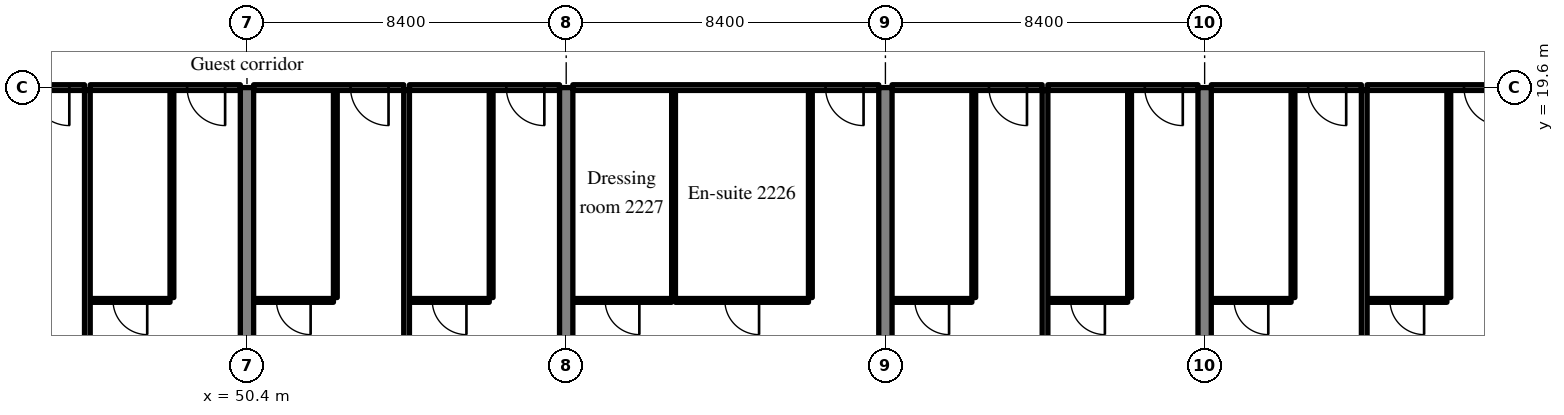
"""IFC4 building model, lengths in metres.
Left out: names, types, materials, properties, quantities, classifications, styles, units other than length and angle.
Written with IfcOpenShell. Run it as: python <this file> out.ifc"""

import sys

from ifc_helpers import new_model, si_unit, direction, frame, frame_2d, origin, place, context, subcontext, project, spatial, rectangle, extrude, source, transform, mapped, element, fill, save


model = new_model("IFC4")
c1 = context("Model", 3, precision=1e-05, world=origin(), true_north=direction((0.0, 1.0)))
c2 = subcontext(c1, "Body", "Model", "MODEL_VIEW")
j1 = project(units=[si_unit("LENGTHUNIT", "METRE"), si_unit("PLANEANGLEUNIT", "RADIAN")], contexts=[c1])
p1 = place(None, origin())
s1 = spatial("IfcSite", under=j1, at=p1, CompositionType="ELEMENT")
p2 = place(p1, origin())
s2 = spatial("IfcBuilding", under=s1, at=p2, CompositionType="ELEMENT")
p3 = place(p2, frame((0.0, 0.0, 95.2)))
s3 = spatial("IfcBuildingStorey", under=s2, at=p3, CompositionType="ELEMENT", Elevation=95.2)
m1 = source(origin(), c2, "Body", "SweptSolid", [
    extrude(rectangle(XDim=13.1, YDim=0.35, at=frame_2d((6.55, 0.0))), origin(), (0.0, 0.0, 1.0), 3.52),
])
p4 = place(p3, frame((50.4, 6.5, 0.0), z_axis=(0.0, 0.0, 1.0), x_axis=(0.0, 1.0, 0.0)))
e1 = element("IfcWall", 1, at=p4, inside=s3, PredefinedType="SHEAR", context=c2, shape_type="MappedRepresentation", body=[
    mapped(m1, transform((0.0, 0.0, 0.0), scale=1.0)),
])
m2 = source(origin(), c2, "Body", "SweptSolid", [
    extrude(rectangle(XDim=14.1, YDim=0.35, at=frame_2d((7.05, 0.0))), origin(), (0.0, 0.0, 1.0), 3.52),
])
for number, where, z_axis, x_axis in (
    (2, (58.8, 5.5, 0.0), (0.0, 0.0, 1.0), (0.0, 1.0, 0.0)),
    (3, (67.2, 5.5, 0.0), (0.0, 0.0, 1.0), (0.0, 1.0, 0.0)),
    (4, (75.6, 5.5, 0.0), (0.0, 0.0, 1.0), (0.0, 1.0, 0.0)),
):
    element("IfcWall", number, at=place(p3, frame(where, z_axis=z_axis, x_axis=x_axis)), inside=s3, PredefinedType="SHEAR", context=c2, shape_type="MappedRepresentation", body=[
        mapped(m2, transform((0.0, 0.0, 0.0), scale=1.0)),
    ])
m3 = source(origin(), c2, "Body", "SweptSolid", [
    extrude(rectangle(XDim=3.95, YDim=0.15, at=frame_2d((1.975, 0.0))), origin(), (0.0, 0.0, 1.0), 2.82),
])
p5 = place(p3, frame((42.175, 19.6, 0.0), z_axis=(0.0, 0.0, 1.0), x_axis=(1.0, 0.0, 0.0)))
e5 = element("IfcWall", 5, at=p5, inside=s3, PredefinedType="PARTITIONING", context=c2, shape_type="MappedRepresentation", body=[
    mapped(m3, transform((0.0, 0.0, 0.0), scale=1.0)),
])
m4 = source(origin(), c2, "Body", "SweptSolid", [
    extrude(rectangle(XDim=1.0, YDim=2.1, at=frame_2d((0.5, 1.05))), frame((0.0, 0.085, 0.0), z_axis=(0.0, -1.0, 0.0), x_axis=(1.0, 0.0, 0.0)), (0.0, 0.0, 1.0), 0.17),
])
p6 = place(p5, frame((2.55, 0.0, 0.0)))
e6 = element("IfcOpeningElement", 6, at=p6, cuts=e5, PredefinedType="OPENING", context=c2, shape_type="MappedRepresentation", body=[
    mapped(m4, transform((0.0, 0.0, 0.0), scale=1.0)),
])
m5 = source(origin(), c2, "Body", "SweptSolid", [
    extrude(rectangle(XDim=5.45, YDim=0.1, at=frame_2d((2.725, 0.0))), origin(), (0.0, 0.0, 1.0), 3.52),
])
p7 = place(p3, frame((48.425, 14.075, 0.0), z_axis=(0.0, 0.0, 1.0), x_axis=(0.0, 1.0, 0.0)))
e7 = element("IfcWall", 7, at=p7, inside=s3, PredefinedType="PARTITIONING", context=c2, shape_type="MappedRepresentation", body=[
    mapped(m5, transform((0.0, 0.0, 0.0), scale=1.0)),
])
m6 = source(origin(), c2, "Body", "SweptSolid", [
    extrude(rectangle(XDim=2.1, YDim=0.1, at=frame_2d((1.05, 0.0))), origin(), (0.0, 0.0, 1.0), 3.52),
])
p8 = place(p3, frame((46.275, 14.0, 0.0), z_axis=(0.0, 0.0, 1.0), x_axis=(1.0, 0.0, 0.0)))
e8 = element("IfcWall", 8, at=p8, inside=s3, PredefinedType="PARTITIONING", context=c2, shape_type="MappedRepresentation", body=[
    mapped(m6, transform((0.0, 0.0, 0.0), scale=1.0)),
])
m7 = source(origin(), c2, "Body", "SweptSolid", [
    extrude(rectangle(XDim=0.9, YDim=2.1, at=frame_2d((0.45, 1.05))), frame((0.0, 0.06, 0.0), z_axis=(0.0, -1.0, 0.0), x_axis=(1.0, 0.0, 0.0)), (0.0, 0.0, 1.0), 0.12),
])
p9 = place(p8, frame((0.6, 0.0, 0.0)))
e9 = element("IfcOpeningElement", 9, at=p9, cuts=e8, PredefinedType="OPENING", context=c2, shape_type="MappedRepresentation", body=[
    mapped(m7, transform((0.0, 0.0, 0.0), scale=1.0)),
])
m8 = source(origin(), c2, "Body", "SweptSolid", [
    extrude(rectangle(XDim=3.95, YDim=0.15, at=frame_2d((1.975, 0.0))), origin(), (0.0, 0.0, 1.0), 2.82),
])
p10 = place(p3, frame((46.275, 19.6, 0.0), z_axis=(0.0, 0.0, 1.0), x_axis=(1.0, 0.0, 0.0)))
e10 = element("IfcWall", 10, at=p10, inside=s3, PredefinedType="PARTITIONING", context=c2, shape_type="MappedRepresentation", body=[
    mapped(m8, transform((0.0, 0.0, 0.0), scale=1.0)),
])
p11 = place(p10, frame((2.55, 0.0, 0.0)))
e11 = element("IfcOpeningElement", 11, at=p11, cuts=e10, PredefinedType="OPENING", context=c2, shape_type="MappedRepresentation", body=[
    mapped(m4, transform((0.0, 0.0, 0.0), scale=1.0)),
])
m9 = source(origin(), c2, "Body", "SweptSolid", [
    extrude(rectangle(XDim=14.906, YDim=0.15, at=frame_2d((7.453, 0.0))), origin(), (0.0, 0.0, 1.0), 3.52),
])
p12 = place(p3, frame((46.2, 4.619, 0.0), z_axis=(0.0, 0.0, 1.0), x_axis=(0.0, 1.0, 0.0)))
e12 = element("IfcWall", 12, at=p12, inside=s3, PredefinedType="PARTITIONING", context=c2, shape_type="MappedRepresentation", body=[
    mapped(m9, transform((0.0, 0.0, 0.0), scale=1.0)),
])
p13 = place(p3, frame((52.725, 14.075, 0.0), z_axis=(0.0, 0.0, 1.0), x_axis=(0.0, 1.0, 0.0)))
e13 = element("IfcWall", 13, at=p13, inside=s3, PredefinedType="PARTITIONING", context=c2, shape_type="MappedRepresentation", body=[
    mapped(m5, transform((0.0, 0.0, 0.0), scale=1.0)),
])
p14 = place(p3, frame((50.575, 14.0, 0.0), z_axis=(0.0, 0.0, 1.0), x_axis=(1.0, 0.0, 0.0)))
e14 = element("IfcWall", 14, at=p14, inside=s3, PredefinedType="PARTITIONING", context=c2, shape_type="MappedRepresentation", body=[
    mapped(m6, transform((0.0, 0.0, 0.0), scale=1.0)),
])
p15 = place(p14, frame((0.6, 0.0, 0.0)))
e15 = element("IfcOpeningElement", 15, at=p15, cuts=e14, PredefinedType="OPENING", context=c2, shape_type="MappedRepresentation", body=[
    mapped(m7, transform((0.0, 0.0, 0.0), scale=1.0)),
])
p16 = place(p3, frame((50.575, 19.6, 0.0), z_axis=(0.0, 0.0, 1.0), x_axis=(1.0, 0.0, 0.0)))
e16 = element("IfcWall", 16, at=p16, inside=s3, PredefinedType="PARTITIONING", context=c2, shape_type="MappedRepresentation", body=[
    mapped(m3, transform((0.0, 0.0, 0.0), scale=1.0)),
])
p17 = place(p16, frame((2.55, 0.0, 0.0)))
e17 = element("IfcOpeningElement", 17, at=p17, cuts=e16, PredefinedType="OPENING", context=c2, shape_type="MappedRepresentation", body=[
    mapped(m4, transform((0.0, 0.0, 0.0), scale=1.0)),
])
p18 = place(p3, frame((56.825, 14.075, 0.0), z_axis=(0.0, 0.0, 1.0), x_axis=(0.0, 1.0, 0.0)))
e18 = element("IfcWall", 18, at=p18, inside=s3, PredefinedType="PARTITIONING", context=c2, shape_type="MappedRepresentation", body=[
    mapped(m5, transform((0.0, 0.0, 0.0), scale=1.0)),
])
m10 = source(origin(), c2, "Body", "SweptSolid", [
    extrude(rectangle(XDim=2.1, YDim=0.1, at=frame_2d((1.05, 0.0))), origin(), (0.0, 0.0, 1.0), 3.52),
])
p19 = place(p3, frame((54.675, 14.0, 0.0), z_axis=(0.0, 0.0, 1.0), x_axis=(1.0, 0.0, 0.0)))
e19 = element("IfcWall", 19, at=p19, inside=s3, PredefinedType="PARTITIONING", context=c2, shape_type="MappedRepresentation", body=[
    mapped(m10, transform((0.0, 0.0, 0.0), scale=1.0)),
])
p20 = place(p19, frame((0.6, 0.0, 0.0)))
e20 = element("IfcOpeningElement", 20, at=p20, cuts=e19, PredefinedType="OPENING", context=c2, shape_type="MappedRepresentation", body=[
    mapped(m7, transform((0.0, 0.0, 0.0), scale=1.0)),
])
p21 = place(p3, frame((54.675, 19.6, 0.0), z_axis=(0.0, 0.0, 1.0), x_axis=(1.0, 0.0, 0.0)))
e21 = element("IfcWall", 21, at=p21, inside=s3, PredefinedType="PARTITIONING", context=c2, shape_type="MappedRepresentation", body=[
    mapped(m3, transform((0.0, 0.0, 0.0), scale=1.0)),
])
p22 = place(p21, frame((2.55, 0.0, 0.0)))
e22 = element("IfcOpeningElement", 22, at=p22, cuts=e21, PredefinedType="OPENING", context=c2, shape_type="MappedRepresentation", body=[
    mapped(m4, transform((0.0, 0.0, 0.0), scale=1.0)),
])
p23 = place(p3, frame((54.6, 4.619, 0.0), z_axis=(0.0, 0.0, 1.0), x_axis=(0.0, 1.0, 0.0)))
e23 = element("IfcWall", 23, at=p23, inside=s3, PredefinedType="PARTITIONING", context=c2, shape_type="MappedRepresentation", body=[
    mapped(m9, transform((0.0, 0.0, 0.0), scale=1.0)),
])
for number, where, z_axis, x_axis in (
    (24, (65.225, 14.075, 0.0), (0.0, 0.0, 1.0), (0.0, 1.0, 0.0)),
    (25, (61.625, 14.075, 0.0), (0.0, 0.0, 1.0), (0.0, 1.0, 0.0)),
):
    element("IfcWall", number, at=place(p3, frame(where, z_axis=z_axis, x_axis=x_axis)), inside=s3, PredefinedType="PARTITIONING", context=c2, shape_type="MappedRepresentation", body=[
        mapped(m5, transform((0.0, 0.0, 0.0), scale=1.0)),
    ])
m11 = source(origin(), c2, "Body", "SweptSolid", [
    extrude(rectangle(XDim=3.5, YDim=0.1, at=frame_2d((1.75, 0.0))), origin(), (0.0, 0.0, 1.0), 3.52),
])
p24 = place(p3, frame((61.675, 14.0, 0.0), z_axis=(0.0, 0.0, 1.0), x_axis=(1.0, 0.0, 0.0)))
e26 = element("IfcWall", 26, at=p24, inside=s3, PredefinedType="PARTITIONING", context=c2, shape_type="MappedRepresentation", body=[
    mapped(m11, transform((0.0, 0.0, 0.0), scale=1.0)),
])
p25 = place(p24, frame((1.3, 0.0, 0.0)))
e27 = element("IfcOpeningElement", 27, at=p25, cuts=e26, PredefinedType="OPENING", context=c2, shape_type="MappedRepresentation", body=[
    mapped(m7, transform((0.0, 0.0, 0.0), scale=1.0)),
])
m12 = source(origin(), c2, "Body", "SweptSolid", [
    extrude(rectangle(XDim=2.6, YDim=0.1, at=frame_2d((1.3, 0.0))), origin(), (0.0, 0.0, 1.0), 3.52),
])
p26 = place(p3, frame((58.975, 14.0, 0.0), z_axis=(0.0, 0.0, 1.0), x_axis=(1.0, 0.0, 0.0)))
e28 = element("IfcWall", 28, at=p26, inside=s3, PredefinedType="PARTITIONING", context=c2, shape_type="MappedRepresentation", body=[
    mapped(m12, transform((0.0, 0.0, 0.0), scale=1.0)),
])
p27 = place(p26, frame((0.85, 0.0, 0.0)))
e29 = element("IfcOpeningElement", 29, at=p27, cuts=e28, PredefinedType="OPENING", context=c2, shape_type="MappedRepresentation", body=[
    mapped(m7, transform((0.0, 0.0, 0.0), scale=1.0)),
])
m13 = source(origin(), c2, "Body", "SweptSolid", [
    extrude(rectangle(XDim=8.05, YDim=0.15, at=frame_2d((4.025, 0.0))), origin(), (0.0, 0.0, 1.0), 2.82),
])
p28 = place(p3, frame((58.975, 19.6, 0.0), z_axis=(0.0, 0.0, 1.0), x_axis=(1.0, 0.0, 0.0)))
e30 = element("IfcWall", 30, at=p28, inside=s3, PredefinedType="PARTITIONING", context=c2, shape_type="MappedRepresentation", body=[
    mapped(m13, transform((0.0, 0.0, 0.0), scale=1.0)),
])
p29 = place(p28, frame((6.65, 0.0, 0.0)))
e31 = element("IfcOpeningElement", 31, at=p29, cuts=e30, PredefinedType="OPENING", context=c2, shape_type="MappedRepresentation", body=[
    mapped(m4, transform((0.0, 0.0, 0.0), scale=1.0)),
])
p30 = place(p3, frame((69.525, 14.075, 0.0), z_axis=(0.0, 0.0, 1.0), x_axis=(0.0, 1.0, 0.0)))
e32 = element("IfcWall", 32, at=p30, inside=s3, PredefinedType="PARTITIONING", context=c2, shape_type="MappedRepresentation", body=[
    mapped(m5, transform((0.0, 0.0, 0.0), scale=1.0)),
])
p31 = place(p3, frame((67.375, 14.0, 0.0), z_axis=(0.0, 0.0, 1.0), x_axis=(1.0, 0.0, 0.0)))
e33 = element("IfcWall", 33, at=p31, inside=s3, PredefinedType="PARTITIONING", context=c2, shape_type="MappedRepresentation", body=[
    mapped(m6, transform((0.0, 0.0, 0.0), scale=1.0)),
])
p32 = place(p31, frame((0.6, 0.0, 0.0)))
e34 = element("IfcOpeningElement", 34, at=p32, cuts=e33, PredefinedType="OPENING", context=c2, shape_type="MappedRepresentation", body=[
    mapped(m7, transform((0.0, 0.0, 0.0), scale=1.0)),
])
p33 = place(p3, frame((67.375, 19.6, 0.0), z_axis=(0.0, 0.0, 1.0), x_axis=(1.0, 0.0, 0.0)))
e35 = element("IfcWall", 35, at=p33, inside=s3, PredefinedType="PARTITIONING", context=c2, shape_type="MappedRepresentation", body=[
    mapped(m3, transform((0.0, 0.0, 0.0), scale=1.0)),
])
p34 = place(p33, frame((2.55, 0.0, 0.0)))
e36 = element("IfcOpeningElement", 36, at=p34, cuts=e35, PredefinedType="OPENING", context=c2, shape_type="MappedRepresentation", body=[
    mapped(m4, transform((0.0, 0.0, 0.0), scale=1.0)),
])
p35 = place(p3, frame((73.625, 14.075, 0.0), z_axis=(0.0, 0.0, 1.0), x_axis=(0.0, 1.0, 0.0)))
e37 = element("IfcWall", 37, at=p35, inside=s3, PredefinedType="PARTITIONING", context=c2, shape_type="MappedRepresentation", body=[
    mapped(m5, transform((0.0, 0.0, 0.0), scale=1.0)),
])
p36 = place(p3, frame((71.475, 14.0, 0.0), z_axis=(0.0, 0.0, 1.0), x_axis=(1.0, 0.0, 0.0)))
e38 = element("IfcWall", 38, at=p36, inside=s3, PredefinedType="PARTITIONING", context=c2, shape_type="MappedRepresentation", body=[
    mapped(m10, transform((0.0, 0.0, 0.0), scale=1.0)),
])
p37 = place(p36, frame((0.6, 0.0, 0.0)))
e39 = element("IfcOpeningElement", 39, at=p37, cuts=e38, PredefinedType="OPENING", context=c2, shape_type="MappedRepresentation", body=[
    mapped(m7, transform((0.0, 0.0, 0.0), scale=1.0)),
])
p38 = place(p3, frame((71.475, 19.6, 0.0), z_axis=(0.0, 0.0, 1.0), x_axis=(1.0, 0.0, 0.0)))
e40 = element("IfcWall", 40, at=p38, inside=s3, PredefinedType="PARTITIONING", context=c2, shape_type="MappedRepresentation", body=[
    mapped(m3, transform((0.0, 0.0, 0.0), scale=1.0)),
])
p39 = place(p38, frame((2.55, 0.0, 0.0)))
e41 = element("IfcOpeningElement", 41, at=p39, cuts=e40, PredefinedType="OPENING", context=c2, shape_type="MappedRepresentation", body=[
    mapped(m4, transform((0.0, 0.0, 0.0), scale=1.0)),
])
m14 = source(origin(), c2, "Body", "SweptSolid", [
    extrude(rectangle(XDim=12.275, YDim=0.15, at=frame_2d((6.137, 0.0))), origin(), (0.0, 0.0, 1.0), 3.52),
])
p40 = place(p3, frame((71.4, 7.25, 0.0), z_axis=(0.0, 0.0, 1.0), x_axis=(0.0, 1.0, 0.0)))
e42 = element("IfcWall", 42, at=p40, inside=s3, PredefinedType="PARTITIONING", context=c2, shape_type="MappedRepresentation", body=[
    mapped(m14, transform((0.0, 0.0, 0.0), scale=1.0)),
])
p41 = place(p3, frame((77.925, 14.075, 0.0), z_axis=(0.0, 0.0, 1.0), x_axis=(0.0, 1.0, 0.0)))
e43 = element("IfcWall", 43, at=p41, inside=s3, PredefinedType="PARTITIONING", context=c2, shape_type="MappedRepresentation", body=[
    mapped(m5, transform((0.0, 0.0, 0.0), scale=1.0)),
])
p42 = place(p3, frame((75.775, 14.0, 0.0), z_axis=(0.0, 0.0, 1.0), x_axis=(1.0, 0.0, 0.0)))
e44 = element("IfcWall", 44, at=p42, inside=s3, PredefinedType="PARTITIONING", context=c2, shape_type="MappedRepresentation", body=[
    mapped(m6, transform((0.0, 0.0, 0.0), scale=1.0)),
])
p43 = place(p42, frame((0.6, 0.0, 0.0)))
e45 = element("IfcOpeningElement", 45, at=p43, cuts=e44, PredefinedType="OPENING", context=c2, shape_type="MappedRepresentation", body=[
    mapped(m7, transform((0.0, 0.0, 0.0), scale=1.0)),
])
p44 = place(p3, frame((75.775, 19.6, 0.0), z_axis=(0.0, 0.0, 1.0), x_axis=(1.0, 0.0, 0.0)))
e46 = element("IfcWall", 46, at=p44, inside=s3, PredefinedType="PARTITIONING", context=c2, shape_type="MappedRepresentation", body=[
    mapped(m8, transform((0.0, 0.0, 0.0), scale=1.0)),
])
p45 = place(p44, frame((2.55, 0.0, 0.0)))
e47 = element("IfcOpeningElement", 47, at=p45, cuts=e46, PredefinedType="OPENING", context=c2, shape_type="MappedRepresentation", body=[
    mapped(m4, transform((0.0, 0.0, 0.0), scale=1.0)),
])
p46 = place(p3, frame((82.025, 14.075, 0.0), z_axis=(0.0, 0.0, 1.0), x_axis=(0.0, 1.0, 0.0)))
e48 = element("IfcWall", 48, at=p46, inside=s3, PredefinedType="PARTITIONING", context=c2, shape_type="MappedRepresentation", body=[
    mapped(m5, transform((0.0, 0.0, 0.0), scale=1.0)),
])
p47 = place(p3, frame((79.875, 14.0, 0.0), z_axis=(0.0, 0.0, 1.0), x_axis=(1.0, 0.0, 0.0)))
e49 = element("IfcWall", 49, at=p47, inside=s3, PredefinedType="PARTITIONING", context=c2, shape_type="MappedRepresentation", body=[
    mapped(m6, transform((0.0, 0.0, 0.0), scale=1.0)),
])
p48 = place(p47, frame((0.6, 0.0, 0.0)))
e50 = element("IfcOpeningElement", 50, at=p48, cuts=e49, PredefinedType="OPENING", context=c2, shape_type="MappedRepresentation", body=[
    mapped(m7, transform((0.0, 0.0, 0.0), scale=1.0)),
])
p49 = place(p3, frame((79.875, 19.6, 0.0), z_axis=(0.0, 0.0, 1.0), x_axis=(1.0, 0.0, 0.0)))
e51 = element("IfcWall", 51, at=p49, inside=s3, PredefinedType="PARTITIONING", context=c2, shape_type="MappedRepresentation", body=[
    mapped(m3, transform((0.0, 0.0, 0.0), scale=1.0)),
])
p50 = place(p49, frame((2.55, 0.0, 0.0)))
e52 = element("IfcOpeningElement", 52, at=p50, cuts=e51, PredefinedType="OPENING", context=c2, shape_type="MappedRepresentation", body=[
    mapped(m4, transform((0.0, 0.0, 0.0), scale=1.0)),
])
p51 = place(p3, frame((79.8, 7.25, 0.0), z_axis=(0.0, 0.0, 1.0), x_axis=(0.0, 1.0, 0.0)))
e53 = element("IfcWall", 53, at=p51, inside=s3, PredefinedType="PARTITIONING", context=c2, shape_type="MappedRepresentation", body=[
    mapped(m14, transform((0.0, 0.0, 0.0), scale=1.0)),
])
m15 = source(origin(), c2, "Body", "SweptSolid", [
    extrude(rectangle(XDim=1.0, YDim=2.1, at=frame_2d((0.5, 1.05))), frame((0.0, 0.025, 0.0), z_axis=(0.0, -1.0, 0.0), x_axis=(1.0, 0.0, 0.0)), (0.0, 0.0, 1.0), 0.05),
])
p52 = place(p6, origin())
e54 = element("IfcDoor", 54, at=p52, inside=s3, OperationType="SINGLE_SWING_RIGHT", PredefinedType="DOOR", context=c2, shape_type="MappedRepresentation", body=[
    mapped(m15, transform((0.0, 0.0, 0.0), scale=1.0)),
])
fill(e6, e54)
m16 = source(origin(), c2, "Body", "SweptSolid", [
    extrude(rectangle(XDim=0.9, YDim=2.1, at=frame_2d((0.45, 1.05))), frame((0.0, 0.025, 0.0), z_axis=(0.0, -1.0, 0.0), x_axis=(1.0, 0.0, 0.0)), (0.0, 0.0, 1.0), 0.05),
])
p53 = place(p9, origin())
e55 = element("IfcDoor", 55, at=p53, inside=s3, OperationType="SINGLE_SWING_RIGHT", PredefinedType="DOOR", context=c2, shape_type="MappedRepresentation", body=[
    mapped(m16, transform((0.0, 0.0, 0.0), scale=1.0)),
])
fill(e9, e55)
p54 = place(p11, origin())
e56 = element("IfcDoor", 56, at=p54, inside=s3, OperationType="SINGLE_SWING_RIGHT", PredefinedType="DOOR", context=c2, shape_type="MappedRepresentation", body=[
    mapped(m15, transform((0.0, 0.0, 0.0), scale=1.0)),
])
fill(e11, e56)
p55 = place(p15, origin())
e57 = element("IfcDoor", 57, at=p55, inside=s3, OperationType="SINGLE_SWING_RIGHT", PredefinedType="DOOR", context=c2, shape_type="MappedRepresentation", body=[
    mapped(m16, transform((0.0, 0.0, 0.0), scale=1.0)),
])
fill(e15, e57)
p56 = place(p17, origin())
e58 = element("IfcDoor", 58, at=p56, inside=s3, OperationType="SINGLE_SWING_RIGHT", PredefinedType="DOOR", context=c2, shape_type="MappedRepresentation", body=[
    mapped(m15, transform((0.0, 0.0, 0.0), scale=1.0)),
])
fill(e17, e58)
p57 = place(p20, origin())
e59 = element("IfcDoor", 59, at=p57, inside=s3, OperationType="SINGLE_SWING_RIGHT", PredefinedType="DOOR", context=c2, shape_type="MappedRepresentation", body=[
    mapped(m16, transform((0.0, 0.0, 0.0), scale=1.0)),
])
fill(e20, e59)
p58 = place(p22, origin())
e60 = element("IfcDoor", 60, at=p58, inside=s3, OperationType="SINGLE_SWING_RIGHT", PredefinedType="DOOR", context=c2, shape_type="MappedRepresentation", body=[
    mapped(m15, transform((0.0, 0.0, 0.0), scale=1.0)),
])
fill(e22, e60)
p59 = place(p25, origin())
e61 = element("IfcDoor", 61, at=p59, inside=s3, OperationType="SINGLE_SWING_RIGHT", PredefinedType="DOOR", context=c2, shape_type="MappedRepresentation", body=[
    mapped(m16, transform((0.0, 0.0, 0.0), scale=1.0)),
])
fill(e27, e61)
p60 = place(p27, origin())
e62 = element("IfcDoor", 62, at=p60, inside=s3, OperationType="SINGLE_SWING_RIGHT", PredefinedType="DOOR", context=c2, shape_type="MappedRepresentation", body=[
    mapped(m16, transform((0.0, 0.0, 0.0), scale=1.0)),
])
fill(e29, e62)
p61 = place(p29, origin())
e63 = element("IfcDoor", 63, at=p61, inside=s3, OperationType="SINGLE_SWING_RIGHT", PredefinedType="DOOR", context=c2, shape_type="MappedRepresentation", body=[
    mapped(m15, transform((0.0, 0.0, 0.0), scale=1.0)),
])
fill(e31, e63)
p62 = place(p32, origin())
e64 = element("IfcDoor", 64, at=p62, inside=s3, OperationType="SINGLE_SWING_RIGHT", PredefinedType="DOOR", context=c2, shape_type="MappedRepresentation", body=[
    mapped(m16, transform((0.0, 0.0, 0.0), scale=1.0)),
])
fill(e34, e64)
p63 = place(p34, origin())
e65 = element("IfcDoor", 65, at=p63, inside=s3, OperationType="SINGLE_SWING_RIGHT", PredefinedType="DOOR", context=c2, shape_type="MappedRepresentation", body=[
    mapped(m15, transform((0.0, 0.0, 0.0), scale=1.0)),
])
fill(e36, e65)
p64 = place(p37, origin())
e66 = element("IfcDoor", 66, at=p64, inside=s3, OperationType="SINGLE_SWING_RIGHT", PredefinedType="DOOR", context=c2, shape_type="MappedRepresentation", body=[
    mapped(m16, transform((0.0, 0.0, 0.0), scale=1.0)),
])
fill(e39, e66)
p65 = place(p39, origin())
e67 = element("IfcDoor", 67, at=p65, inside=s3, OperationType="SINGLE_SWING_RIGHT", PredefinedType="DOOR", context=c2, shape_type="MappedRepresentation", body=[
    mapped(m15, transform((0.0, 0.0, 0.0), scale=1.0)),
])
fill(e41, e67)
p66 = place(p43, origin())
e68 = element("IfcDoor", 68, at=p66, inside=s3, OperationType="SINGLE_SWING_RIGHT", PredefinedType="DOOR", context=c2, shape_type="MappedRepresentation", body=[
    mapped(m16, transform((0.0, 0.0, 0.0), scale=1.0)),
])
fill(e45, e68)
p67 = place(p45, origin())
e69 = element("IfcDoor", 69, at=p67, inside=s3, OperationType="SINGLE_SWING_RIGHT", PredefinedType="DOOR", context=c2, shape_type="MappedRepresentation", body=[
    mapped(m15, transform((0.0, 0.0, 0.0), scale=1.0)),
])
fill(e47, e69)
p68 = place(p48, origin())
e70 = element("IfcDoor", 70, at=p68, inside=s3, OperationType="SINGLE_SWING_RIGHT", PredefinedType="DOOR", context=c2, shape_type="MappedRepresentation", body=[
    mapped(m16, transform((0.0, 0.0, 0.0), scale=1.0)),
])
fill(e50, e70)
p69 = place(p50, origin())
e71 = element("IfcDoor", 71, at=p69, inside=s3, OperationType="SINGLE_SWING_RIGHT", PredefinedType="DOOR", context=c2, shape_type="MappedRepresentation", body=[
    mapped(m15, transform((0.0, 0.0, 0.0), scale=1.0)),
])
fill(e52, e71)
save(model, sys.argv[1])
